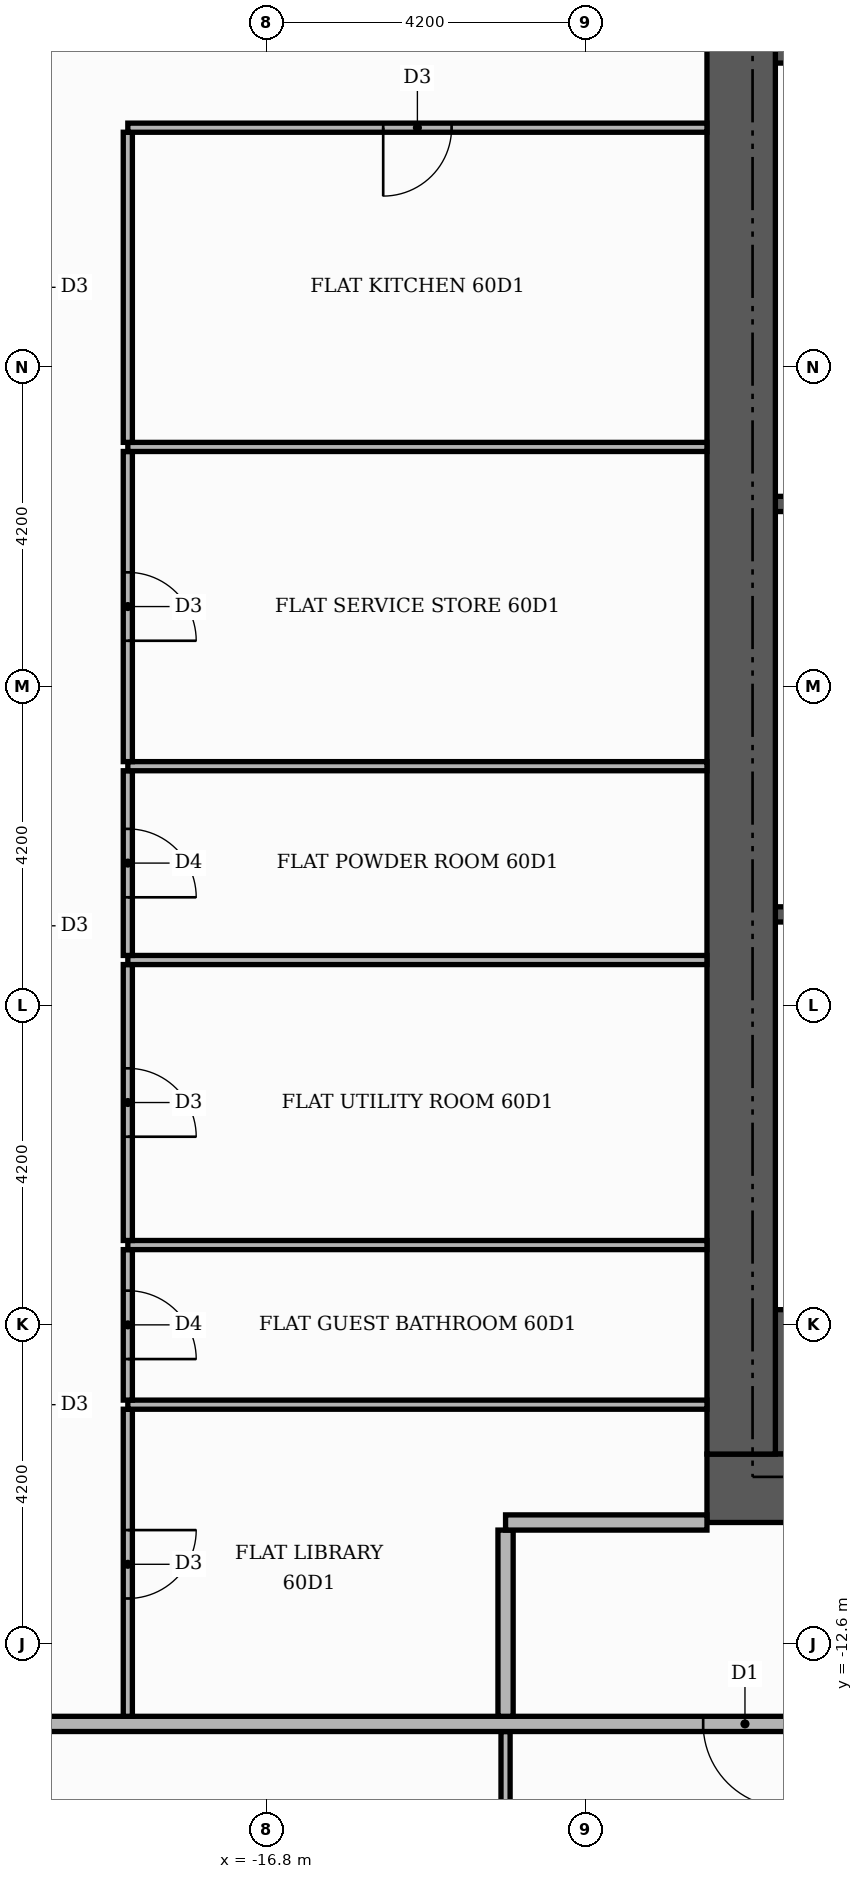
"""IFC4 building model, lengths in metres.
Left out: names, types, materials, properties, quantities, classifications, styles, units other than length and angle.
Written with IfcOpenShell. Run it as: python <this file> out.ifc"""

import sys

from ifc_helpers import new_model, si_unit, direction, frame, frame_2d, origin, place, context, subcontext, project, spatial, rectangle, extrude, element, fill, save


model = new_model("IFC4")
c1 = context("Model", 3, precision=1e-05, world=origin(), true_north=direction((0.0, 1.0)))
c2 = subcontext(c1, "Body", "Model", "MODEL_VIEW")
j1 = project(units=[si_unit("LENGTHUNIT", "METRE"), si_unit("PLANEANGLEUNIT", "RADIAN")], contexts=[c1])
p1 = place(None, origin())
s1 = spatial("IfcSite", under=j1, at=p1, CompositionType="ELEMENT")
p2 = place(p1, origin())
s2 = spatial("IfcBuilding", under=s1, at=p2, CompositionType="ELEMENT")
p3 = place(p2, frame((0.0, 0.0, 252.3)))
s3 = spatial("IfcBuildingStorey", under=s2, at=p3, CompositionType="ELEMENT", Elevation=252.3)
for number, where, z_axis, x_axis in (
    (1, (-10.1, -9.15, 0.0), (0.0, 0.0, 1.0), (1.0, 0.0, 0.0)),
    (2, (-10.1, 9.15, 0.0), (0.0, 0.0, 1.0), (1.0, 0.0, 0.0)),
):
    element("IfcWall", number, at=place(p3, frame(where, z_axis=z_axis, x_axis=x_axis)), inside=s3, PredefinedType="SHEAR", context=c2, shape_type="SweptSolid", body=[
        extrude(rectangle(XDim=4.6, YDim=1.9, at=frame_2d((2.3, 0.0))), origin(), (0.0, 0.0, 1.0), 3.48),
    ])
for number, where, z_axis, x_axis in (
    (3, (-10.1, -3.0, 0.0), (0.0, 0.0, 1.0), (1.0, 0.0, 0.0)),
    (4, (-10.1, 2.4, 0.0), (0.0, 0.0, 1.0), (1.0, 0.0, 0.0)),
):
    element("IfcWall", number, at=place(p3, frame(where, z_axis=z_axis, x_axis=x_axis)), inside=s3, PredefinedType="SHEAR", context=c2, shape_type="SweptSolid", body=[
        extrude(rectangle(XDim=0.9, YDim=0.2, at=frame_2d((0.45, 0.0))), origin(), (0.0, 0.0, 1.0), 3.48),
    ])
p4 = place(p3, frame((-11.0, -10.55, 0.0), z_axis=(0.0, 0.0, 1.0), x_axis=(1.0, 0.0, 0.0)))
e5 = element("IfcWall", 5, at=p4, inside=s3, PredefinedType="SHEAR", context=c2, shape_type="SweptSolid", body=[
    extrude(rectangle(XDim=22.0, YDim=0.9, at=frame_2d((11.0, 0.0))), origin(), (0.0, 0.0, 1.0), 3.48),
])
p5 = place(p4, frame((7.4, 0.0, 0.0)))
e6 = element("IfcOpeningElement", 6, at=p5, cuts=e5, PredefinedType="OPENING", context=c2, shape_type="SweptSolid", body=[
    extrude(rectangle(XDim=1.8, YDim=2.2, at=frame_2d((0.9, 1.1))), frame((0.0, 0.46, 0.0), z_axis=(0.0, -1.0, 0.0), x_axis=(1.0, 0.0, 0.0)), (0.0, 0.0, 1.0), 0.92),
])
p6 = place(p3, frame((-10.55, -10.1, 0.0), z_axis=(0.0, 0.0, 1.0), x_axis=(0.0, 1.0, 0.0)))
e7 = element("IfcWall", 7, at=p6, inside=s3, PredefinedType="SHEAR", context=c2, shape_type="SweptSolid", body=[
    extrude(rectangle(XDim=20.2, YDim=0.9, at=frame_2d((10.1, 0.0))), origin(), (0.0, 0.0, 1.0), 3.48),
])
p7 = place(p3, frame((-13.65, -20.66, 0.0), z_axis=(0.0, 0.0, 1.0), x_axis=(0.0, 1.0, 0.0)))
e8 = element("IfcWall", 8, at=p7, inside=s3, PredefinedType="PARTITIONING", context=c2, shape_type="SweptSolid", body=[
    extrude(rectangle(XDim=6.91, YDim=0.12, at=frame_2d((3.455, 0.0))), origin(), (0.0, 0.0, 1.0), 3.48),
])
p8 = place(p7, frame((3.025, 0.0, 0.0)))
e9 = element("IfcOpeningElement", 9, at=p8, cuts=e8, PredefinedType="OPENING", context=c2, shape_type="SweptSolid", body=[
    extrude(rectangle(XDim=0.9, YDim=2.1, at=frame_2d((0.45, 1.05))), frame((0.0, 0.07, 0.0), z_axis=(0.0, -1.0, 0.0), x_axis=(1.0, 0.0, 0.0)), (0.0, 0.0, 1.0), 0.14),
])
p9 = place(p3, frame((-25.42, -13.65, 0.0), z_axis=(0.0, 0.0, 1.0), x_axis=(1.0, 0.0, 0.0)))
e10 = element("IfcWall", 10, at=p9, inside=s3, PredefinedType="PARTITIONING", context=c2, shape_type="SweptSolid", body=[
    extrude(rectangle(XDim=39.07, YDim=0.2, at=frame_2d((19.535, 0.0))), origin(), (0.0, 0.0, 1.0), 3.48),
])
p10 = place(p9, frame((14.37, 0.0, 0.0)))
e11 = element("IfcOpeningElement", 11, at=p10, cuts=e10, PredefinedType="OPENING", context=c2, shape_type="SweptSolid", body=[
    extrude(rectangle(XDim=1.1, YDim=2.4, at=frame_2d((0.55, 1.2))), frame((0.0, 0.11, 0.0), z_axis=(0.0, -1.0, 0.0), x_axis=(1.0, 0.0, 0.0)), (0.0, 0.0, 1.0), 0.22),
])
p11 = place(p3, frame((-18.62, -13.55, 0.0), z_axis=(0.0, 0.0, 1.0), x_axis=(0.0, 1.0, 0.0)))
e12 = element("IfcWall", 12, at=p11, inside=s3, PredefinedType="PARTITIONING", context=c2, shape_type="SweptSolid", body=[
    extrude(rectangle(XDim=4.04, YDim=0.12, at=frame_2d((2.02, 0.0))), origin(), (0.0, 0.0, 1.0), 3.48),
])
p12 = place(p11, frame((1.55, 0.0, 0.0)))
e13 = element("IfcOpeningElement", 13, at=p12, cuts=e12, PredefinedType="OPENING", context=c2, shape_type="SweptSolid", body=[
    extrude(rectangle(XDim=0.9, YDim=2.1, at=frame_2d((0.45, 1.05))), frame((0.0, 0.07, 0.0), z_axis=(0.0, -1.0, 0.0), x_axis=(1.0, 0.0, 0.0)), (0.0, 0.0, 1.0), 0.14),
])
p13 = place(p3, frame((-13.65, -13.55, 0.0), z_axis=(0.0, 0.0, 1.0), x_axis=(0.0, 1.0, 0.0)))
e14 = element("IfcWall", 14, at=p13, inside=s3, PredefinedType="PARTITIONING", context=c2, shape_type="SweptSolid", body=[
    extrude(rectangle(XDim=2.45, YDim=0.2, at=frame_2d((1.225, 0.0))), origin(), (0.0, 0.0, 1.0), 3.48),
])
p14 = place(p3, frame((-13.65, -11.0, 0.0), z_axis=(0.0, 0.0, 1.0), x_axis=(1.0, 0.0, 0.0)))
e15 = element("IfcWall", 15, at=p14, inside=s3, PredefinedType="PARTITIONING", context=c2, shape_type="SweptSolid", body=[
    extrude(rectangle(XDim=2.65, YDim=0.2, at=frame_2d((1.325, 0.0))), origin(), (0.0, 0.0, 1.0), 3.48),
])
p15 = place(p3, frame((-18.62, -9.45, 0.0), z_axis=(0.0, 0.0, 1.0), x_axis=(1.0, 0.0, 0.0)))
e16 = element("IfcWall", 16, at=p15, inside=s3, PredefinedType="PARTITIONING", context=c2, shape_type="SweptSolid", body=[
    extrude(rectangle(XDim=7.62, YDim=0.12, at=frame_2d((3.81, 0.0))), origin(), (0.0, 0.0, 1.0), 3.48),
])
p16 = place(p3, frame((-18.62, -9.39, 0.0), z_axis=(0.0, 0.0, 1.0), x_axis=(0.0, 1.0, 0.0)))
e17 = element("IfcWall", 17, at=p16, inside=s3, PredefinedType="PARTITIONING", context=c2, shape_type="SweptSolid", body=[
    extrude(rectangle(XDim=1.98, YDim=0.12, at=frame_2d((0.99, 0.0))), origin(), (0.0, 0.0, 1.0), 3.48),
])
p17 = place(p16, frame((0.54, 0.0, 0.0)))
e18 = element("IfcOpeningElement", 18, at=p17, cuts=e17, PredefinedType="OPENING", context=c2, shape_type="SweptSolid", body=[
    extrude(rectangle(XDim=0.9, YDim=2.1, at=frame_2d((0.45, 1.05))), frame((0.0, 0.07, 0.0), z_axis=(0.0, -1.0, 0.0), x_axis=(1.0, 0.0, 0.0)), (0.0, 0.0, 1.0), 0.14),
])
p18 = place(p3, frame((-18.62, -7.35, 0.0), z_axis=(0.0, 0.0, 1.0), x_axis=(1.0, 0.0, 0.0)))
e19 = element("IfcWall", 19, at=p18, inside=s3, PredefinedType="PARTITIONING", context=c2, shape_type="SweptSolid", body=[
    extrude(rectangle(XDim=7.62, YDim=0.12, at=frame_2d((3.81, 0.0))), origin(), (0.0, 0.0, 1.0), 3.48),
])
p19 = place(p3, frame((-18.62, -7.29, 0.0), z_axis=(0.0, 0.0, 1.0), x_axis=(0.0, 1.0, 0.0)))
e20 = element("IfcWall", 20, at=p19, inside=s3, PredefinedType="PARTITIONING", context=c2, shape_type="SweptSolid", body=[
    extrude(rectangle(XDim=3.63, YDim=0.12, at=frame_2d((1.815, 0.0))), origin(), (0.0, 0.0, 1.0), 3.48),
])
p20 = place(p19, frame((1.365, 0.0, 0.0)))
e21 = element("IfcOpeningElement", 21, at=p20, cuts=e20, PredefinedType="OPENING", context=c2, shape_type="SweptSolid", body=[
    extrude(rectangle(XDim=0.9, YDim=2.1, at=frame_2d((0.45, 1.05))), frame((0.0, 0.07, 0.0), z_axis=(0.0, -1.0, 0.0), x_axis=(1.0, 0.0, 0.0)), (0.0, 0.0, 1.0), 0.14),
])
p21 = place(p3, frame((-18.62, -3.6, 0.0), z_axis=(0.0, 0.0, 1.0), x_axis=(1.0, 0.0, 0.0)))
e22 = element("IfcWall", 22, at=p21, inside=s3, PredefinedType="PARTITIONING", context=c2, shape_type="SweptSolid", body=[
    extrude(rectangle(XDim=7.62, YDim=0.12, at=frame_2d((3.81, 0.0))), origin(), (0.0, 0.0, 1.0), 3.48),
])
p22 = place(p3, frame((-18.62, -3.54, 0.0), z_axis=(0.0, 0.0, 1.0), x_axis=(0.0, 1.0, 0.0)))
e23 = element("IfcWall", 23, at=p22, inside=s3, PredefinedType="PARTITIONING", context=c2, shape_type="SweptSolid", body=[
    extrude(rectangle(XDim=2.43, YDim=0.12, at=frame_2d((1.215, 0.0))), origin(), (0.0, 0.0, 1.0), 3.48),
])
p23 = place(p22, frame((0.765, 0.0, 0.0)))
e24 = element("IfcOpeningElement", 24, at=p23, cuts=e23, PredefinedType="OPENING", context=c2, shape_type="SweptSolid", body=[
    extrude(rectangle(XDim=0.9, YDim=2.1, at=frame_2d((0.45, 1.05))), frame((0.0, 0.07, 0.0), z_axis=(0.0, -1.0, 0.0), x_axis=(1.0, 0.0, 0.0)), (0.0, 0.0, 1.0), 0.14),
])
p24 = place(p3, frame((-18.62, -1.05, 0.0), z_axis=(0.0, 0.0, 1.0), x_axis=(1.0, 0.0, 0.0)))
e25 = element("IfcWall", 25, at=p24, inside=s3, PredefinedType="PARTITIONING", context=c2, shape_type="SweptSolid", body=[
    extrude(rectangle(XDim=7.62, YDim=0.12, at=frame_2d((3.81, 0.0))), origin(), (0.0, 0.0, 1.0), 3.48),
])
p25 = place(p3, frame((-18.62, -0.99, 0.0), z_axis=(0.0, 0.0, 1.0), x_axis=(0.0, 1.0, 0.0)))
e26 = element("IfcWall", 26, at=p25, inside=s3, PredefinedType="PARTITIONING", context=c2, shape_type="SweptSolid", body=[
    extrude(rectangle(XDim=4.08, YDim=0.12, at=frame_2d((2.04, 0.0))), origin(), (0.0, 0.0, 1.0), 3.48),
])
p26 = place(p25, frame((1.59, 0.0, 0.0)))
e27 = element("IfcOpeningElement", 27, at=p26, cuts=e26, PredefinedType="OPENING", context=c2, shape_type="SweptSolid", body=[
    extrude(rectangle(XDim=0.9, YDim=2.1, at=frame_2d((0.45, 1.05))), frame((0.0, 0.07, 0.0), z_axis=(0.0, -1.0, 0.0), x_axis=(1.0, 0.0, 0.0)), (0.0, 0.0, 1.0), 0.14),
])
p27 = place(p3, frame((-18.62, 3.15, 0.0), z_axis=(0.0, 0.0, 1.0), x_axis=(1.0, 0.0, 0.0)))
e28 = element("IfcWall", 28, at=p27, inside=s3, PredefinedType="PARTITIONING", context=c2, shape_type="SweptSolid", body=[
    extrude(rectangle(XDim=7.62, YDim=0.12, at=frame_2d((3.81, 0.0))), origin(), (0.0, 0.0, 1.0), 3.48),
])
p28 = place(p3, frame((-18.62, 3.21, 0.0), z_axis=(0.0, 0.0, 1.0), x_axis=(0.0, 1.0, 0.0)))
e29 = element("IfcWall", 29, at=p28, inside=s3, PredefinedType="PARTITIONING", context=c2, shape_type="SweptSolid", body=[
    extrude(rectangle(XDim=4.08, YDim=0.12, at=frame_2d((2.04, 0.0))), origin(), (0.0, 0.0, 1.0), 3.48),
])
p29 = place(p3, frame((-18.62, 7.35, 0.0), z_axis=(0.0, 0.0, 1.0), x_axis=(1.0, 0.0, 0.0)))
e30 = element("IfcWall", 30, at=p29, inside=s3, PredefinedType="PARTITIONING", context=c2, shape_type="SweptSolid", body=[
    extrude(rectangle(XDim=7.62, YDim=0.12, at=frame_2d((3.81, 0.0))), origin(), (0.0, 0.0, 1.0), 3.48),
])
p30 = place(p29, frame((3.36, 0.0, 0.0)))
e31 = element("IfcOpeningElement", 31, at=p30, cuts=e30, PredefinedType="OPENING", context=c2, shape_type="SweptSolid", body=[
    extrude(rectangle(XDim=0.9, YDim=2.1, at=frame_2d((0.45, 1.05))), frame((0.0, 0.07, 0.0), z_axis=(0.0, -1.0, 0.0), x_axis=(1.0, 0.0, 0.0)), (0.0, 0.0, 1.0), 0.14),
])
p31 = place(p10, frame((1.1, 0.0, 0.0), z_axis=(0.0, 0.0, 1.0), x_axis=(-1.0, 0.0, 0.0)))
e32 = element("IfcDoor", 32, at=p31, inside=s3, OperationType="SINGLE_SWING_RIGHT", PredefinedType="DOOR", context=c2, shape_type="SweptSolid", body=[
    extrude(rectangle(XDim=1.1, YDim=2.4, at=frame_2d((0.55, 1.2))), frame((0.0, 0.025, 0.0), z_axis=(0.0, -1.0, 0.0), x_axis=(1.0, 0.0, 0.0)), (0.0, 0.0, 1.0), 0.05),
])
fill(e11, e32)
p32 = place(p30, frame((0.9, 0.0, 0.0), z_axis=(0.0, 0.0, 1.0), x_axis=(-1.0, 0.0, 0.0)))
e33 = element("IfcDoor", 33, at=p32, inside=s3, OperationType="SINGLE_SWING_LEFT", PredefinedType="DOOR", context=c2, shape_type="SweptSolid", body=[
    extrude(rectangle(XDim=0.9, YDim=2.1, at=frame_2d((0.45, 1.05))), frame((0.0, 0.025, 0.0), z_axis=(0.0, -1.0, 0.0), x_axis=(1.0, 0.0, 0.0)), (0.0, 0.0, 1.0), 0.05),
])
fill(e31, e33)
p33 = place(p26, frame((0.9, 0.0, 0.0), z_axis=(0.0, 0.0, 1.0), x_axis=(-1.0, 0.0, 0.0)))
e34 = element("IfcDoor", 34, at=p33, inside=s3, OperationType="SINGLE_SWING_LEFT", PredefinedType="DOOR", context=c2, shape_type="SweptSolid", body=[
    extrude(rectangle(XDim=0.9, YDim=2.1, at=frame_2d((0.45, 1.05))), frame((0.0, 0.025, 0.0), z_axis=(0.0, -1.0, 0.0), x_axis=(1.0, 0.0, 0.0)), (0.0, 0.0, 1.0), 0.05),
])
fill(e27, e34)
p34 = place(p23, frame((0.9, 0.0, 0.0), z_axis=(0.0, 0.0, 1.0), x_axis=(-1.0, 0.0, 0.0)))
e35 = element("IfcDoor", 35, at=p34, inside=s3, OperationType="SINGLE_SWING_LEFT", PredefinedType="DOOR", context=c2, shape_type="SweptSolid", body=[
    extrude(rectangle(XDim=0.9, YDim=2.1, at=frame_2d((0.45, 1.05))), frame((0.0, 0.025, 0.0), z_axis=(0.0, -1.0, 0.0), x_axis=(1.0, 0.0, 0.0)), (0.0, 0.0, 1.0), 0.05),
])
fill(e24, e35)
p35 = place(p20, frame((0.9, 0.0, 0.0), z_axis=(0.0, 0.0, 1.0), x_axis=(-1.0, 0.0, 0.0)))
e36 = element("IfcDoor", 36, at=p35, inside=s3, OperationType="SINGLE_SWING_LEFT", PredefinedType="DOOR", context=c2, shape_type="SweptSolid", body=[
    extrude(rectangle(XDim=0.9, YDim=2.1, at=frame_2d((0.45, 1.05))), frame((0.0, 0.025, 0.0), z_axis=(0.0, -1.0, 0.0), x_axis=(1.0, 0.0, 0.0)), (0.0, 0.0, 1.0), 0.05),
])
fill(e21, e36)
p36 = place(p17, frame((0.9, 0.0, 0.0), z_axis=(0.0, 0.0, 1.0), x_axis=(-1.0, 0.0, 0.0)))
e37 = element("IfcDoor", 37, at=p36, inside=s3, OperationType="SINGLE_SWING_LEFT", PredefinedType="DOOR", context=c2, shape_type="SweptSolid", body=[
    extrude(rectangle(XDim=0.9, YDim=2.1, at=frame_2d((0.45, 1.05))), frame((0.0, 0.025, 0.0), z_axis=(0.0, -1.0, 0.0), x_axis=(1.0, 0.0, 0.0)), (0.0, 0.0, 1.0), 0.05),
])
fill(e18, e37)
p37 = place(p12, frame((0.9, 0.0, 0.0), z_axis=(0.0, 0.0, 1.0), x_axis=(-1.0, 0.0, 0.0)))
e38 = element("IfcDoor", 38, at=p37, inside=s3, OperationType="SINGLE_SWING_RIGHT", PredefinedType="DOOR", context=c2, shape_type="SweptSolid", body=[
    extrude(rectangle(XDim=0.9, YDim=2.1, at=frame_2d((0.45, 1.05))), frame((0.0, 0.025, 0.0), z_axis=(0.0, -1.0, 0.0), x_axis=(1.0, 0.0, 0.0)), (0.0, 0.0, 1.0), 0.05),
])
fill(e13, e38)
save(model, sys.argv[1])
